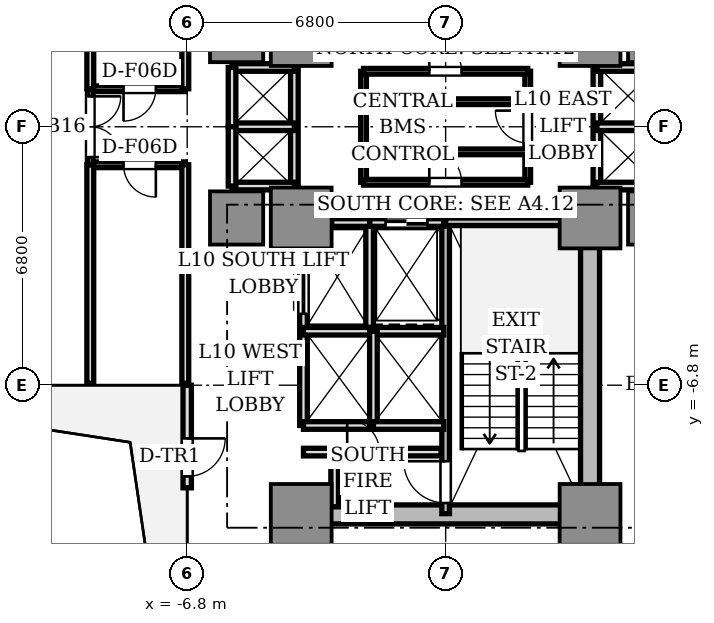
"""IFC4 building model, lengths in metres.
Left out: names, types, materials, properties, quantities, classifications, styles, units other than length and angle.
Written with IfcOpenShell. Run it as: python <this file> out.ifc"""

import sys

from ifc_helpers import new_model, si_unit, direction, frame, frame_2d, origin, origin_2d, place, context, subcontext, project, spatial, rectangle, extrude, source, transform, mapped, element, fill, save


model = new_model("IFC4")
c1 = context("Model", 3, precision=1e-05, world=origin(), true_north=direction((0.0, 1.0)))
c2 = subcontext(c1, "Body", "Model", "MODEL_VIEW")
j1 = project(units=[si_unit("LENGTHUNIT", "METRE"), si_unit("PLANEANGLEUNIT", "RADIAN")], contexts=[c1])
p1 = place(None, origin())
s1 = spatial("IfcSite", under=j1, at=p1, CompositionType="ELEMENT")
p2 = place(p1, origin())
s2 = spatial("IfcBuilding", under=s1, at=p2, CompositionType="ELEMENT")
p3 = place(p2, frame((0.0, 0.0, 39.85)))
s3 = spatial("IfcBuildingStorey", under=s2, at=p3, CompositionType="ELEMENT", Elevation=39.85)
p4 = place(p3, frame((-3.55, -10.2, 0.0), z_axis=(0.0, 0.0, 1.0), x_axis=(1.0, 0.0, 0.0)))
e1 = element("IfcWall", 1, at=p4, inside=s3, PredefinedType="SHEAR", context=c2, shape_type="SweptSolid", body=[
    extrude(rectangle(XDim=7.1, YDim=0.5, at=frame_2d((3.55, 0.0))), origin(), (0.0, 0.0, 1.0), 3.11),
])
p5 = place(p3, frame((3.8, -9.75, 0.0), z_axis=(0.0, 0.0, 1.0), x_axis=(0.0, 1.0, 0.0)))
e2 = element("IfcWall", 2, at=p5, inside=s3, PredefinedType="SHEAR", context=c2, shape_type="SweptSolid", body=[
    extrude(rectangle(XDim=6.9, YDim=0.5, at=frame_2d((3.45, 0.0))), origin(), (0.0, 0.0, 1.0), 3.11),
])
m1 = source(origin(), c2, "Body", "SweptSolid", [
    extrude(rectangle(XDim=1.6, YDim=1.6, at=origin_2d()), origin(), (0.0, 0.0, 1.0), 3.11),
])
for number, where, z_axis, x_axis in (
    (3, (-3.8, 2.4, 0.0), (0.0, 0.0, 1.0), (1.0, 0.0, 0.0)),
    (4, (3.8, 2.4, 0.0), (0.0, 0.0, 1.0), (1.0, 0.0, 0.0)),
    (5, (-3.8, -2.4, 0.0), (0.0, 0.0, 1.0), (1.0, 0.0, 0.0)),
    (6, (3.8, -2.4, 0.0), (0.0, 0.0, 1.0), (1.0, 0.0, 0.0)),
    (7, (-3.8, -10.2, 0.0), (0.0, 0.0, 1.0), (1.0, 0.0, 0.0)),
    (8, (3.8, -10.2, 0.0), (0.0, 0.0, 1.0), (1.0, 0.0, 0.0)),
):
    element("IfcColumn", number, at=place(p3, frame(where, z_axis=z_axis, x_axis=x_axis)), inside=s3, PredefinedType="COLUMN", context=c2, shape_type="MappedRepresentation", body=[
        mapped(m1, transform((0.0, 0.0, 0.0), scale=1.0)),
    ])
m2 = source(origin(), c2, "Body", "SweptSolid", [
    extrude(rectangle(XDim=1.4, YDim=1.4, at=origin_2d()), origin(), (0.0, 0.0, 1.0), 3.11),
])
for number, where, z_axis, x_axis in (
    (9, (5.5, 2.4, 0.0), (0.0, 0.0, 1.0), (1.0, 0.0, 0.0)),
    (10, (-5.5, 2.4, 0.0), (0.0, 0.0, 1.0), (1.0, 0.0, 0.0)),
    (11, (5.5, -2.4, 0.0), (0.0, 0.0, 1.0), (1.0, 0.0, 0.0)),
    (12, (-5.5, -2.4, 0.0), (0.0, 0.0, 1.0), (1.0, 0.0, 0.0)),
):
    element("IfcColumn", number, at=place(p3, frame(where, z_axis=z_axis, x_axis=x_axis)), inside=s3, PredefinedType="COLUMN", context=c2, shape_type="MappedRepresentation", body=[
        mapped(m2, transform((0.0, 0.0, 0.0), scale=1.0)),
    ])
p6 = place(p3, frame((-6.8, -6.8, 0.0), z_axis=(0.0, 0.0, 1.0), x_axis=(0.0, -1.0, 0.0)))
e13 = element("IfcWall", 13, at=p6, inside=s3, PredefinedType="STANDARD", context=c2, shape_type="SweptSolid", body=[
    extrude(rectangle(XDim=2.7, YDim=0.22, at=frame_2d((1.35, 0.0))), origin(), (0.0, 0.0, 1.0), 3.11),
])
p7 = place(p6, frame((1.4, 0.0, 0.0)))
e14 = element("IfcOpeningElement", 14, at=p7, cuts=e13, PredefinedType="OPENING", context=c2, shape_type="SweptSolid", body=[
    extrude(rectangle(XDim=1.0, YDim=2.2, at=frame_2d((0.5, 1.1))), frame((0.0, 0.12, 0.0), z_axis=(0.0, -1.0, 0.0), x_axis=(1.0, 0.0, 0.0)), (0.0, 0.0, 1.0), 0.24),
])
p8 = place(p3, frame((0.0, -10.18, 0.0), z_axis=(0.0, 0.0, 1.0), x_axis=(0.0, 1.0, 0.0)))
e15 = element("IfcWall", 15, at=p8, inside=s3, PredefinedType="SOLIDWALL", context=c2, shape_type="SweptSolid", body=[
    extrude(rectangle(XDim=7.68, YDim=0.2, at=frame_2d((3.84, 0.0))), origin(), (0.0, 0.0, 1.0), 3.11),
])
p9 = place(p8, frame((0.28, 0.0, 0.0)))
e16 = element("IfcOpeningElement", 16, at=p9, cuts=e15, PredefinedType="OPENING", context=c2, shape_type="SweptSolid", body=[
    extrude(rectangle(XDim=1.1, YDim=2.15, at=frame_2d((0.55, 1.075))), frame((0.0, 0.11, 0.0), z_axis=(0.0, -1.0, 0.0), x_axis=(1.0, 0.0, 0.0)), (0.0, 0.0, 1.0), 0.22),
])
p10 = place(p3, frame((0.0, -2.5, 0.0), z_axis=(0.0, 0.0, 1.0), x_axis=(1.0, 0.0, 0.0)))
e17 = element("IfcWall", 17, at=p10, inside=s3, PredefinedType="SOLIDWALL", context=c2, shape_type="SweptSolid", body=[
    extrude(rectangle(XDim=3.72, YDim=0.2, at=frame_2d((1.86, 0.0))), origin(), (0.0, 0.0, 1.0), 3.11),
])
p11 = place(p3, frame((-2.0, -5.28, 0.0), z_axis=(0.0, 0.0, 1.0), x_axis=(0.0, 1.0, 0.0)))
e18 = element("IfcWall", 18, at=p11, inside=s3, PredefinedType="SOLIDWALL", context=c2, shape_type="SweptSolid", body=[
    extrude(rectangle(XDim=2.78, YDim=0.2, at=frame_2d((1.39, 0.0))), origin(), (0.0, 0.0, 1.0), 2.66),
])
p12 = place(p3, frame((-2.0, -2.52, 0.0), z_axis=(0.0, 0.0, 1.0), x_axis=(1.0, 0.0, 0.0)))
e19 = element("IfcWall", 19, at=p12, inside=s3, PredefinedType="SOLIDWALL", context=c2, shape_type="SweptSolid", body=[
    extrude(rectangle(XDim=1.95, YDim=0.2, at=frame_2d((0.975, 0.0))), origin(), (0.0, 0.0, 1.0), 2.66),
])
p13 = place(p12, frame((0.42, 0.0, 0.0)))
e20 = element("IfcOpeningElement", 20, at=p13, cuts=e19, PredefinedType="OPENING", context=c2, shape_type="SweptSolid", body=[
    extrude(rectangle(XDim=1.1, YDim=2.2, at=frame_2d((0.55, 1.1))), frame((0.0, 0.11, 0.0), z_axis=(0.0, -1.0, 0.0), x_axis=(1.0, 0.0, 0.0)), (0.0, 0.0, 1.0), 0.22),
])
p14 = place(p3, frame((-3.0, -2.52, 0.0), z_axis=(0.0, 0.0, 1.0), x_axis=(1.0, 0.0, 0.0)))
e21 = element("IfcWall", 21, at=p14, inside=s3, PredefinedType="SOLIDWALL", context=c2, shape_type="SweptSolid", body=[
    extrude(rectangle(XDim=1.0, YDim=0.2, at=frame_2d((0.5, 0.0))), origin(), (0.0, 0.0, 1.0), 2.66),
])
p15 = place(p3, frame((-3.74, -5.36, 0.0), z_axis=(0.0, 0.0, 1.0), x_axis=(0.0, 1.0, 0.0)))
e22 = element("IfcWall", 22, at=p15, inside=s3, PredefinedType="SOLIDWALL", context=c2, shape_type="SweptSolid", body=[
    extrude(rectangle(XDim=2.08, YDim=0.2, at=frame_2d((1.04, 0.0))), origin(), (0.0, 0.0, 1.0), 2.66),
])
p16 = place(p15, frame((0.44, 0.0, 0.0)))
e23 = element("IfcOpeningElement", 23, at=p16, cuts=e22, PredefinedType="OPENING", context=c2, shape_type="SweptSolid", body=[
    extrude(rectangle(XDim=1.2, YDim=2.2, at=frame_2d((0.6, 1.1))), frame((0.0, 0.11, 0.0), z_axis=(0.0, -1.0, 0.0), x_axis=(1.0, 0.0, 0.0)), (0.0, 0.0, 1.0), 0.22),
])
p17 = place(p3, frame((-3.74, -7.86, 0.0), z_axis=(0.0, 0.0, 1.0), x_axis=(0.0, 1.0, 0.0)))
e24 = element("IfcWall", 24, at=p17, inside=s3, PredefinedType="SOLIDWALL", context=c2, shape_type="SweptSolid", body=[
    extrude(rectangle(XDim=2.48, YDim=0.2, at=frame_2d((1.24, 0.0))), origin(), (0.0, 0.0, 1.0), 2.66),
])
p18 = place(p3, frame((-3.74, -7.86, 0.0), z_axis=(0.0, 0.0, 1.0), x_axis=(1.0, 0.0, 0.0)))
e25 = element("IfcWall", 25, at=p18, inside=s3, PredefinedType="SOLIDWALL", context=c2, shape_type="SweptSolid", body=[
    extrude(rectangle(XDim=1.84, YDim=0.2, at=frame_2d((0.92, 0.0))), origin(), (0.0, 0.0, 1.0), 2.66),
])
p19 = place(p3, frame((-3.74, -5.38, 0.0), z_axis=(0.0, 0.0, 1.0), x_axis=(1.0, 0.0, 0.0)))
e26 = element("IfcWall", 26, at=p19, inside=s3, PredefinedType="SOLIDWALL", context=c2, shape_type="SweptSolid", body=[
    extrude(rectangle(XDim=3.69, YDim=0.2, at=frame_2d((1.845, 0.0))), origin(), (0.0, 0.0, 1.0), 2.66),
])
p20 = place(p3, frame((-1.9, -7.86, 0.0), z_axis=(0.0, 0.0, 1.0), x_axis=(0.0, 1.0, 0.0)))
e27 = element("IfcWall", 27, at=p20, inside=s3, PredefinedType="SOLIDWALL", context=c2, shape_type="SweptSolid", body=[
    extrude(rectangle(XDim=2.48, YDim=0.2, at=frame_2d((1.24, 0.0))), origin(), (0.0, 0.0, 1.0), 2.66),
])
p21 = place(p3, frame((-1.9, -7.86, 0.0), z_axis=(0.0, 0.0, 1.0), x_axis=(1.0, 0.0, 0.0)))
e28 = element("IfcWall", 28, at=p21, inside=s3, PredefinedType="SOLIDWALL", context=c2, shape_type="SweptSolid", body=[
    extrude(rectangle(XDim=1.85, YDim=0.2, at=frame_2d((0.925, 0.0))), origin(), (0.0, 0.0, 1.0), 2.66),
])
p22 = place(p3, frame((3.98, -1.56, 0.0), z_axis=(0.0, 0.0, 1.0), x_axis=(0.0, 1.0, 0.0)))
e29 = element("IfcWall", 29, at=p22, inside=s3, PredefinedType="SOLIDWALL", context=c2, shape_type="SweptSolid", body=[
    extrude(rectangle(XDim=3.12, YDim=0.2, at=frame_2d((1.56, 0.0))), origin(), (0.0, 0.0, 1.0), 2.18),
])
for number, where, z_axis, x_axis in (
    (30, (3.98, 1.56, 0.0), (0.0, 0.0, 1.0), (1.0, 0.0, 0.0)),
    (31, (3.98, -1.56, 0.0), (0.0, 0.0, 1.0), (1.0, 0.0, 0.0)),
    (32, (3.98, 0.0, 0.0), (0.0, 0.0, 1.0), (1.0, 0.0, 0.0)),
):
    element("IfcWall", number, at=place(p3, frame(where, z_axis=z_axis, x_axis=x_axis)), inside=s3, PredefinedType="SOLIDWALL", context=c2, shape_type="SweptSolid", body=[
        extrude(rectangle(XDim=1.64, YDim=0.2, at=frame_2d((0.82, 0.0))), origin(), (0.0, 0.0, 1.0), 2.66),
    ])
p23 = place(p3, frame((-3.98, -1.56, 0.0), z_axis=(0.0, 0.0, 1.0), x_axis=(0.0, 1.0, 0.0)))
e33 = element("IfcWall", 33, at=p23, inside=s3, PredefinedType="SOLIDWALL", context=c2, shape_type="SweptSolid", body=[
    extrude(rectangle(XDim=3.12, YDim=0.2, at=frame_2d((1.56, 0.0))), origin(), (0.0, 0.0, 1.0), 2.18),
])
for number, where, z_axis, x_axis in (
    (34, (-5.62, 1.56, 0.0), (0.0, 0.0, 1.0), (1.0, 0.0, 0.0)),
    (35, (-5.62, -1.56, 0.0), (0.0, 0.0, 1.0), (1.0, 0.0, 0.0)),
    (36, (-5.62, 0.0, 0.0), (0.0, 0.0, 1.0), (1.0, 0.0, 0.0)),
):
    element("IfcWall", number, at=place(p3, frame(where, z_axis=z_axis, x_axis=x_axis)), inside=s3, PredefinedType="SOLIDWALL", context=c2, shape_type="SweptSolid", body=[
        extrude(rectangle(XDim=1.64, YDim=0.2, at=frame_2d((0.82, 0.0))), origin(), (0.0, 0.0, 1.0), 2.66),
    ])
for number, where, z_axis, x_axis in (
    (37, (-5.62, 0.0, 0.0), (0.0, 0.0, 1.0), (0.0, 1.0, 0.0)),
    (38, (-5.62, -1.56, 0.0), (0.0, 0.0, 1.0), (0.0, 1.0, 0.0)),
):
    element("IfcWall", number, at=place(p3, frame(where, z_axis=z_axis, x_axis=x_axis)), inside=s3, PredefinedType="SOLIDWALL", context=c2, shape_type="SweptSolid", body=[
        extrude(rectangle(XDim=1.56, YDim=0.2, at=frame_2d((0.78, 0.0))), origin(), (0.0, 0.0, 1.0), 2.66),
    ])
p24 = place(p3, frame((-3.74, -8.56, 0.0), z_axis=(0.0, 0.0, 1.0), x_axis=(1.0, 0.0, 0.0)))
e39 = element("IfcWall", 39, at=p24, inside=s3, PredefinedType="SOLIDWALL", context=c2, shape_type="SweptSolid", body=[
    extrude(rectangle(XDim=3.62, YDim=0.2, at=frame_2d((1.81, 0.0))), origin(), (0.0, 0.0, 1.0), 2.66),
])
p25 = place(p24, frame((1.15, 0.0, 0.0)))
e40 = element("IfcOpeningElement", 40, at=p25, cuts=e39, PredefinedType="OPENING", context=c2, shape_type="SweptSolid", body=[
    extrude(rectangle(XDim=0.85, YDim=2.1, at=frame_2d((0.425, 1.05))), frame((0.0, 0.11, 0.0), z_axis=(0.0, -1.0, 0.0), x_axis=(1.0, 0.0, 0.0)), (0.0, 0.0, 1.0), 0.22),
])
p26 = place(p3, frame((-2.92, -10.0, 0.0), z_axis=(0.0, 0.0, 1.0), x_axis=(0.0, 1.0, 0.0)))
e41 = element("IfcWall", 41, at=p26, inside=s3, PredefinedType="SOLIDWALL", context=c2, shape_type="SweptSolid", body=[
    extrude(rectangle(XDim=1.44, YDim=0.2, at=frame_2d((0.72, 0.0))), origin(), (0.0, 0.0, 1.0), 2.66),
])
p27 = place(p3, frame((2.16, -1.46, 0.0), z_axis=(0.0, 0.0, 1.0), x_axis=(0.0, 1.0, 0.0)))
e42 = element("IfcWall", 42, at=p27, inside=s3, PredefinedType="PARTITIONING", context=c2, shape_type="SweptSolid", body=[
    extrude(rectangle(XDim=2.92, YDim=0.15, at=frame_2d((1.46, 0.0))), origin(), (0.0, 0.0, 1.0), 2.66),
])
p28 = place(p27, frame((1.035, 0.0, 0.0)))
e43 = element("IfcOpeningElement", 43, at=p28, cuts=e42, PredefinedType="OPENING", context=c2, shape_type="SweptSolid", body=[
    extrude(rectangle(XDim=0.85, YDim=2.1, at=frame_2d((0.425, 1.05))), frame((0.0, 0.085, 0.0), z_axis=(0.0, -1.0, 0.0), x_axis=(1.0, 0.0, 0.0)), (0.0, 0.0, 1.0), 0.17),
])
p29 = place(p3, frame((-2.16, -1.46, 0.0), z_axis=(0.0, 0.0, 1.0), x_axis=(0.0, 1.0, 0.0)))
e44 = element("IfcWall", 44, at=p29, inside=s3, PredefinedType="PARTITIONING", context=c2, shape_type="SweptSolid", body=[
    extrude(rectangle(XDim=2.92, YDim=0.15, at=frame_2d((1.46, 0.0))), origin(), (0.0, 0.0, 1.0), 2.66),
])
p30 = place(p3, frame((-2.16, 1.46, 0.0), z_axis=(0.0, 0.0, 1.0), x_axis=(1.0, 0.0, 0.0)))
e45 = element("IfcWall", 45, at=p30, inside=s3, PredefinedType="PARTITIONING", context=c2, shape_type="SweptSolid", body=[
    extrude(rectangle(XDim=4.32, YDim=0.15, at=frame_2d((2.16, 0.0))), origin(), (0.0, 0.0, 1.0), 2.66),
])
p31 = place(p30, frame((1.73, 0.0, 0.0)))
e46 = element("IfcOpeningElement", 46, at=p31, cuts=e45, PredefinedType="OPENING", context=c2, shape_type="SweptSolid", body=[
    extrude(rectangle(XDim=0.85, YDim=2.1, at=frame_2d((0.425, 1.05))), frame((0.0, 0.085, 0.0), z_axis=(0.0, -1.0, 0.0), x_axis=(1.0, 0.0, 0.0)), (0.0, 0.0, 1.0), 0.17),
])
p32 = place(p3, frame((-2.16, -1.46, 0.0), z_axis=(0.0, 0.0, 1.0), x_axis=(1.0, 0.0, 0.0)))
e47 = element("IfcWall", 47, at=p32, inside=s3, PredefinedType="PARTITIONING", context=c2, shape_type="SweptSolid", body=[
    extrude(rectangle(XDim=4.32, YDim=0.15, at=frame_2d((2.16, 0.0))), origin(), (0.0, 0.0, 1.0), 2.66),
])
p33 = place(p32, frame((1.73, 0.0, 0.0)))
e48 = element("IfcOpeningElement", 48, at=p33, cuts=e47, PredefinedType="OPENING", context=c2, shape_type="SweptSolid", body=[
    extrude(rectangle(XDim=0.85, YDim=2.1, at=frame_2d((0.425, 1.05))), frame((0.0, 0.085, 0.0), z_axis=(0.0, -1.0, 0.0), x_axis=(1.0, 0.0, 0.0)), (0.0, 0.0, 1.0), 0.17),
])
for number, where, z_axis, x_axis in (
    (49, (-2.16, 0.66, 0.0), (0.0, 0.0, 1.0), (1.0, 0.0, 0.0)),
    (50, (-2.16, -0.66, 0.0), (0.0, 0.0, 1.0), (1.0, 0.0, 0.0)),
):
    element("IfcWall", number, at=place(p3, frame(where, z_axis=z_axis, x_axis=x_axis)), inside=s3, PredefinedType="PARTITIONING", context=c2, shape_type="SweptSolid", body=[
        extrude(rectangle(XDim=4.32, YDim=0.15, at=frame_2d((2.16, 0.0))), origin(), (0.0, 0.0, 1.0), 2.66),
    ])
p34 = place(p3, frame((-6.85, -1.0, 0.0), z_axis=(0.0, 0.0, 1.0), x_axis=(-1.0, 0.0, 0.0)))
e51 = element("IfcWall", 51, at=p34, inside=s3, PredefinedType="PARTITIONING", context=c2, shape_type="SweptSolid", body=[
    extrude(rectangle(XDim=2.5, YDim=0.15, at=frame_2d((1.25, 0.0))), origin(), (0.0, 0.0, 1.0), 2.66),
])
p35 = place(p34, frame((0.775, 0.0, 0.0)))
e52 = element("IfcOpeningElement", 52, at=p35, cuts=e51, PredefinedType="OPENING", context=c2, shape_type="SweptSolid", body=[
    extrude(rectangle(XDim=0.85, YDim=2.1, at=frame_2d((0.425, 1.05))), frame((0.0, 0.085, 0.0), z_axis=(0.0, -1.0, 0.0), x_axis=(1.0, 0.0, 0.0)), (0.0, 0.0, 1.0), 0.17),
])
p36 = place(p3, frame((-6.85, 1.0, 0.0), z_axis=(0.0, 0.0, 1.0), x_axis=(-1.0, 0.0, 0.0)))
e53 = element("IfcWall", 53, at=p36, inside=s3, PredefinedType="PARTITIONING", context=c2, shape_type="SweptSolid", body=[
    extrude(rectangle(XDim=2.5, YDim=0.15, at=frame_2d((1.25, 0.0))), origin(), (0.0, 0.0, 1.0), 2.66),
])
p37 = place(p36, frame((0.775, 0.0, 0.0)))
e54 = element("IfcOpeningElement", 54, at=p37, cuts=e53, PredefinedType="OPENING", context=c2, shape_type="SweptSolid", body=[
    extrude(rectangle(XDim=0.85, YDim=2.1, at=frame_2d((0.425, 1.05))), frame((0.0, 0.085, 0.0), z_axis=(0.0, -1.0, 0.0), x_axis=(1.0, 0.0, 0.0)), (0.0, 0.0, 1.0), 0.17),
])
for number, where, z_axis, x_axis in (
    (55, (-6.85, -1.0, 0.0), (0.0, 0.0, 1.0), (0.0, -1.0, 0.0)),
    (56, (-6.85, 6.75, 0.0), (0.0, 0.0, 1.0), (0.0, -1.0, 0.0)),
    (57, (-9.35, 1.0, 0.0), (0.0, 0.0, 1.0), (0.0, 1.0, 0.0)),
    (58, (-9.35, -1.0, 0.0), (0.0, 0.0, 1.0), (0.0, -1.0, 0.0)),
):
    element("IfcWall", number, at=place(p3, frame(where, z_axis=z_axis, x_axis=x_axis)), inside=s3, PredefinedType="PARTITIONING", context=c2, shape_type="SweptSolid", body=[
        extrude(rectangle(XDim=5.75, YDim=0.18, at=frame_2d((2.875, 0.0))), origin(), (0.0, 0.0, 1.0), 2.66),
    ])
p38 = place(p3, frame((-9.35, 1.0, 0.0), z_axis=(0.0, 0.0, 1.0), x_axis=(0.0, -1.0, 0.0)))
e59 = element("IfcWall", 59, at=p38, inside=s3, PredefinedType="PARTITIONING", context=c2, shape_type="SweptSolid", body=[
    extrude(rectangle(XDim=2.0, YDim=0.15, at=frame_2d((1.0, 0.0))), origin(), (0.0, 0.0, 1.0), 2.66),
])
p39 = place(p38, frame((0.2, 0.0, 0.0)))
e60 = element("IfcOpeningElement", 60, at=p39, cuts=e59, PredefinedType="OPENING", context=c2, shape_type="SweptSolid", body=[
    extrude(rectangle(XDim=1.6, YDim=2.25, at=frame_2d((0.8, 1.125))), frame((0.0, 0.085, 0.0), z_axis=(0.0, -1.0, 0.0), x_axis=(1.0, 0.0, 0.0)), (0.0, 0.0, 1.0), 0.17),
])
m3 = source(origin(), c2, "Body", "SweptSolid", [
    extrude(rectangle(XDim=1.0, YDim=0.05, at=origin_2d()), origin(), (0.0, 0.0, 1.0), 2.2),
])
p40 = place(p7, frame((0.5, 0.0, 0.0)))
e61 = element("IfcDoor", 61, at=p40, inside=s3, OperationType="SINGLE_SWING_LEFT", PredefinedType="DOOR", context=c2, shape_type="MappedRepresentation", body=[
    mapped(m3, transform((0.0, 0.0, 0.0), scale=1.0)),
])
fill(e14, e61)
m4 = source(origin(), c2, "Body", "SweptSolid", [
    extrude(rectangle(XDim=1.1, YDim=0.05, at=origin_2d()), origin(), (0.0, 0.0, 1.0), 2.2),
])
p41 = place(p13, frame((0.55, 0.0, 0.0)))
e62 = element("IfcDoor", 62, at=p41, inside=s3, OperationType="DOUBLE_DOOR_SLIDING", PredefinedType="DOOR", context=c2, shape_type="MappedRepresentation", body=[
    mapped(m4, transform((0.0, 0.0, 0.0), scale=1.0)),
])
fill(e20, e62)
m5 = source(origin(), c2, "Body", "SweptSolid", [
    extrude(rectangle(XDim=1.2, YDim=0.05, at=origin_2d()), origin(), (0.0, 0.0, 1.0), 2.2),
])
p42 = place(p16, frame((0.6, 0.0, 0.0)))
e63 = element("IfcDoor", 63, at=p42, inside=s3, OperationType="DOUBLE_DOOR_SLIDING", PredefinedType="DOOR", context=c2, shape_type="MappedRepresentation", body=[
    mapped(m5, transform((0.0, 0.0, 0.0), scale=1.0)),
])
fill(e23, e63)
m6 = source(origin(), c2, "Body", "SweptSolid", [
    extrude(rectangle(XDim=1.1, YDim=0.05, at=origin_2d()), origin(), (0.0, 0.0, 1.0), 2.15),
])
p43 = place(p9, frame((0.55, 0.0, 0.0)))
e64 = element("IfcDoor", 64, at=p43, inside=s3, OperationType="SINGLE_SWING_RIGHT", PredefinedType="DOOR", context=c2, shape_type="MappedRepresentation", body=[
    mapped(m6, transform((0.0, 0.0, 0.0), scale=1.0)),
])
fill(e16, e64)
m7 = source(origin(), c2, "Body", "SweptSolid", [
    extrude(rectangle(XDim=0.85, YDim=0.05, at=origin_2d()), origin(), (0.0, 0.0, 1.0), 2.1),
])
p44 = place(p25, frame((0.425, 0.0, 0.0)))
e65 = element("IfcDoor", 65, at=p44, inside=s3, OperationType="SINGLE_SWING_LEFT", PredefinedType="DOOR", context=c2, shape_type="MappedRepresentation", body=[
    mapped(m7, transform((0.0, 0.0, 0.0), scale=1.0)),
])
fill(e40, e65)
p45 = place(p31, frame((0.425, 0.0, 0.0)))
e66 = element("IfcDoor", 66, at=p45, inside=s3, OperationType="SINGLE_SWING_LEFT", PredefinedType="DOOR", context=c2, shape_type="MappedRepresentation", body=[
    mapped(m7, transform((0.0, 0.0, 0.0), scale=1.0)),
])
fill(e46, e66)
p46 = place(p28, frame((0.425, 0.0, 0.0)))
e67 = element("IfcDoor", 67, at=p46, inside=s3, OperationType="SINGLE_SWING_RIGHT", PredefinedType="DOOR", context=c2, shape_type="MappedRepresentation", body=[
    mapped(m7, transform((0.0, 0.0, 0.0), scale=1.0)),
])
fill(e43, e67)
p47 = place(p33, frame((0.425, 0.0, 0.0)))
e68 = element("IfcDoor", 68, at=p47, inside=s3, OperationType="SINGLE_SWING_LEFT", PredefinedType="DOOR", context=c2, shape_type="MappedRepresentation", body=[
    mapped(m7, transform((0.0, 0.0, 0.0), scale=1.0)),
])
fill(e48, e68)
p48 = place(p37, frame((0.425, 0.0, 0.0)))
e69 = element("IfcDoor", 69, at=p48, inside=s3, OperationType="SINGLE_SWING_RIGHT", PredefinedType="DOOR", context=c2, shape_type="MappedRepresentation", body=[
    mapped(m7, transform((0.0, 0.0, 0.0), scale=1.0)),
])
fill(e54, e69)
p49 = place(p35, frame((0.425, 0.0, 0.0)))
e70 = element("IfcDoor", 70, at=p49, inside=s3, OperationType="SINGLE_SWING_LEFT", PredefinedType="DOOR", context=c2, shape_type="MappedRepresentation", body=[
    mapped(m7, transform((0.0, 0.0, 0.0), scale=1.0)),
])
fill(e52, e70)
m8 = source(origin(), c2, "Body", "SweptSolid", [
    extrude(rectangle(XDim=1.6, YDim=0.05, at=origin_2d()), origin(), (0.0, 0.0, 1.0), 2.25),
])
p50 = place(p39, frame((0.8, 0.0, 0.0)))
e71 = element("IfcDoor", 71, at=p50, inside=s3, OperationType="DOUBLE_DOOR_SINGLE_SWING", PredefinedType="DOOR", context=c2, shape_type="MappedRepresentation", body=[
    mapped(m8, transform((0.0, 0.0, 0.0), scale=1.0)),
])
fill(e60, e71)
save(model, sys.argv[1])
